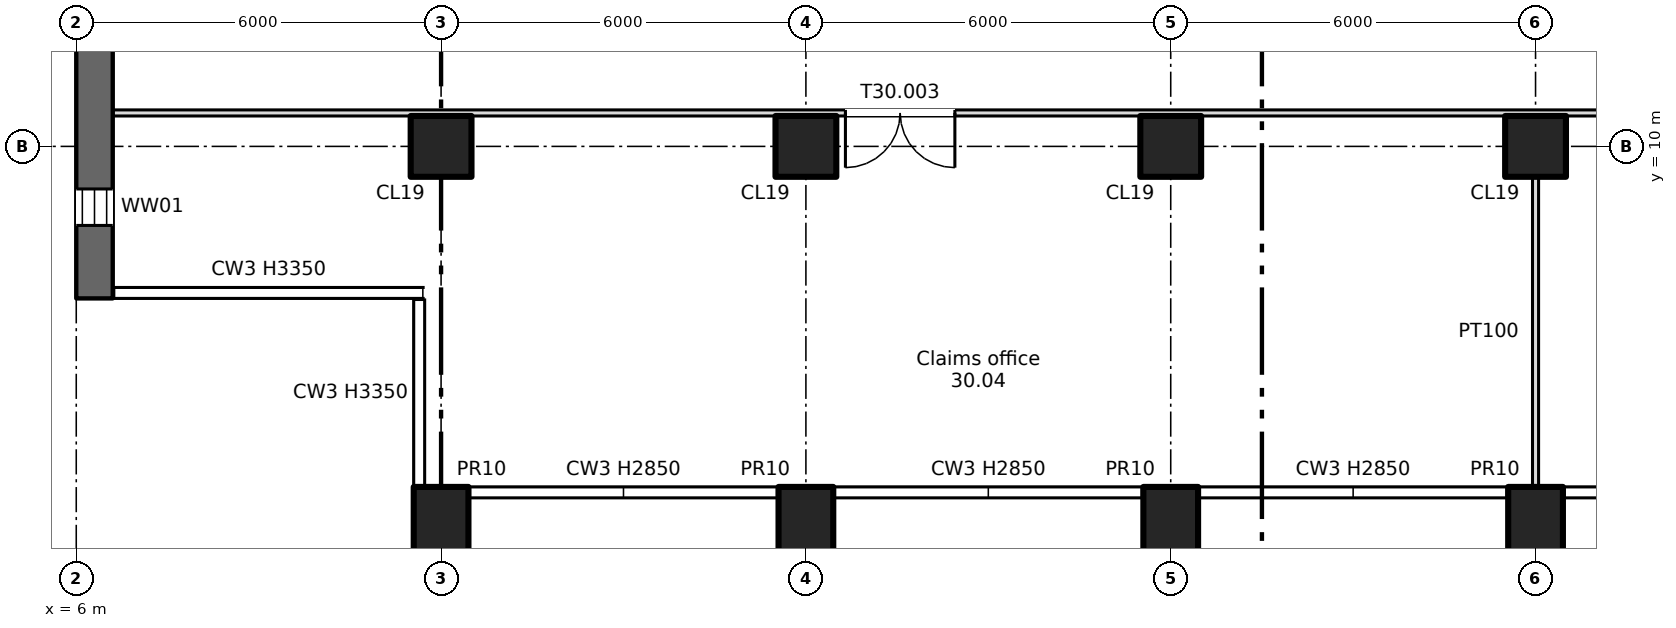
"""IFC4 building model, lengths in metres.
Left out: names, types, materials, properties, quantities, classifications, styles, units other than length and angle.
Written with IfcOpenShell. Run it as: python <this file> out.ifc"""

import sys

from ifc_helpers import new_model, si_unit, direction, frame, frame_2d, origin, origin_2d, place, context, subcontext, project, spatial, rectangle, extrude, element, fill, save


model = new_model("IFC4")
c1 = context("Model", 3, precision=1e-05, world=origin(), true_north=direction((0.0, 1.0)))
c2 = subcontext(c1, "Body", "Model", "MODEL_VIEW")
j1 = project(units=[si_unit("LENGTHUNIT", "METRE"), si_unit("PLANEANGLEUNIT", "RADIAN")], contexts=[c1])
p1 = place(None, origin())
s1 = spatial("IfcSite", under=j1, at=p1, CompositionType="ELEMENT")
p2 = place(p1, origin())
s2 = spatial("IfcBuilding", under=s1, at=p2, CompositionType="ELEMENT")
p3 = place(p2, frame((0.0, 0.0, 211.75)))
s3 = spatial("IfcBuildingStorey", under=s2, at=p3, CompositionType="ELEMENT", Elevation=211.75)
for number, where, z_axis, x_axis in (
    (1, (12.0, 3.7, -0.4), (0.0, 0.0, 1.0), (1.0, 0.0, 0.0)),
    (2, (18.0, 3.7, -0.4), (0.0, 0.0, 1.0), (1.0, 0.0, 0.0)),
    (3, (24.0, 3.7, -0.4), (0.0, 0.0, 1.0), (1.0, 0.0, 0.0)),
    (4, (30.0, 3.7, -0.4), (0.0, 0.0, 1.0), (1.0, 0.0, 0.0)),
):
    element("IfcColumn", number, at=place(p3, frame(where, z_axis=z_axis, x_axis=x_axis)), inside=s3, PredefinedType="COLUMN", context=c2, shape_type="SweptSolid", body=[
        extrude(rectangle(XDim=0.9, YDim=1.4, at=origin_2d()), origin(), (0.0, 0.0, 1.0), 3.75),
    ])
for number, where, z_axis, x_axis in (
    (5, (12.0, 10.0, 0.0), (0.0, 0.0, 1.0), (1.0, 0.0, 0.0)),
    (6, (18.0, 10.0, 0.0), (0.0, 0.0, 1.0), (1.0, 0.0, 0.0)),
    (7, (24.0, 10.0, 0.0), (0.0, 0.0, 1.0), (1.0, 0.0, 0.0)),
    (8, (30.0, 10.0, 0.0), (0.0, 0.0, 1.0), (1.0, 0.0, 0.0)),
):
    element("IfcColumn", number, at=place(p3, frame(where, z_axis=z_axis, x_axis=x_axis)), inside=s3, PredefinedType="COLUMN", context=c2, shape_type="SweptSolid", body=[
        extrude(rectangle(XDim=1.0, YDim=1.0, at=origin_2d()), origin(), (0.0, 0.0, 1.0), 3.35),
    ])
p4 = place(p3, frame((6.3, 7.5, 0.0), z_axis=(0.0, 0.0, 1.0), x_axis=(0.0, 1.0, 0.0)))
e9 = element("IfcWall", 9, at=p4, inside=s3, PredefinedType="SHEAR", context=c2, shape_type="SweptSolid", body=[
    extrude(rectangle(XDim=34.0, YDim=0.6, at=frame_2d((17.0, 0.0))), origin(), (0.0, 0.0, 1.0), 3.35),
])
p5 = place(p4, frame((1.2, 0.0, 0.6)))
e10 = element("IfcOpeningElement", 10, at=p5, cuts=e9, PredefinedType="OPENING", context=c2, shape_type="SweptSolid", body=[
    extrude(rectangle(XDim=0.6, YDim=2.4, at=frame_2d((0.3, 1.2))), frame((0.0, 0.31, 0.0), z_axis=(0.0, -1.0, 0.0), x_axis=(1.0, 0.0, 0.0)), (0.0, 0.0, 1.0), 0.62),
])
p6 = place(p4, frame((7.2, 0.0, 0.6)))
e11 = element("IfcOpeningElement", 11, at=p6, cuts=e9, PredefinedType="OPENING", context=c2, shape_type="SweptSolid", body=[
    extrude(rectangle(XDim=0.6, YDim=2.4, at=frame_2d((0.3, 1.2))), frame((0.0, 0.31, 0.0), z_axis=(0.0, -1.0, 0.0), x_axis=(1.0, 0.0, 0.0)), (0.0, 0.0, 1.0), 0.62),
])
p7 = place(p4, frame((13.2, 0.0, 0.6)))
e12 = element("IfcOpeningElement", 12, at=p7, cuts=e9, PredefinedType="OPENING", context=c2, shape_type="SweptSolid", body=[
    extrude(rectangle(XDim=0.6, YDim=2.4, at=frame_2d((0.3, 1.2))), frame((0.0, 0.31, 0.0), z_axis=(0.0, -1.0, 0.0), x_axis=(1.0, 0.0, 0.0)), (0.0, 0.0, 1.0), 0.62),
])
p8 = place(p4, frame((19.2, 0.0, 0.6)))
e13 = element("IfcOpeningElement", 13, at=p8, cuts=e9, PredefinedType="OPENING", context=c2, shape_type="SweptSolid", body=[
    extrude(rectangle(XDim=0.6, YDim=2.4, at=frame_2d((0.3, 1.2))), frame((0.0, 0.31, 0.0), z_axis=(0.0, -1.0, 0.0), x_axis=(1.0, 0.0, 0.0)), (0.0, 0.0, 1.0), 0.62),
])
p9 = place(p3, frame((6.6, 10.55, 0.0), z_axis=(0.0, 0.0, 1.0), x_axis=(1.0, 0.0, 0.0)))
e14 = element("IfcWall", 14, at=p9, inside=s3, PredefinedType="PARTITIONING", context=c2, shape_type="SweptSolid", body=[
    extrude(rectangle(XDim=64.8, YDim=0.1, at=frame_2d((32.4, 0.0))), origin(), (0.0, 0.0, 1.0), 3.35),
])
p10 = place(p9, frame((30.0, 0.0, 0.0)))
e15 = element("IfcOpeningElement", 15, at=p10, cuts=e14, PredefinedType="OPENING", context=c2, shape_type="SweptSolid", body=[
    extrude(rectangle(XDim=1.8, YDim=2.1, at=frame_2d((0.9, 1.05))), frame((0.0, 0.06, 0.0), z_axis=(0.0, -1.0, 0.0), x_axis=(1.0, 0.0, 0.0)), (0.0, 0.0, 1.0), 0.12),
])
p11 = place(p9, frame((42.0, 0.0, 0.0)))
e16 = element("IfcOpeningElement", 16, at=p11, cuts=e14, PredefinedType="OPENING", context=c2, shape_type="SweptSolid", body=[
    extrude(rectangle(XDim=1.8, YDim=2.1, at=frame_2d((0.9, 1.05))), frame((0.0, 0.06, 0.0), z_axis=(0.0, -1.0, 0.0), x_axis=(1.0, 0.0, 0.0)), (0.0, 0.0, 1.0), 0.12),
])
p12 = place(p9, frame((12.05, 0.0, 0.0)))
e17 = element("IfcOpeningElement", 17, at=p12, cuts=e14, PredefinedType="OPENING", context=c2, shape_type="SweptSolid", body=[
    extrude(rectangle(XDim=1.8, YDim=2.1, at=frame_2d((0.9, 1.05))), frame((0.0, 0.06, 0.0), z_axis=(0.0, -1.0, 0.0), x_axis=(1.0, 0.0, 0.0)), (0.0, 0.0, 1.0), 0.12),
])
p13 = place(p9, frame((55.2, 0.0, 0.0)))
e18 = element("IfcOpeningElement", 18, at=p13, cuts=e14, PredefinedType="OPENING", context=c2, shape_type="SweptSolid", body=[
    extrude(rectangle(XDim=1.8, YDim=2.1, at=frame_2d((0.9, 1.05))), frame((0.0, 0.06, 0.0), z_axis=(0.0, -1.0, 0.0), x_axis=(1.0, 0.0, 0.0)), (0.0, 0.0, 1.0), 0.12),
])
p14 = place(p3, frame((30.0, 4.4, 0.0), z_axis=(0.0, 0.0, 1.0), x_axis=(0.0, 1.0, 0.0)))
e19 = element("IfcWall", 19, at=p14, inside=s3, PredefinedType="PARTITIONING", context=c2, shape_type="SweptSolid", body=[
    extrude(rectangle(XDim=5.1, YDim=0.1, at=frame_2d((2.55, 0.0))), origin(), (0.0, 0.0, 1.0), 3.35),
])
p15 = place(p5, origin())
e20 = element("IfcWindow", 20, at=p15, inside=s3, PartitioningType="SINGLE_PANEL", PredefinedType="WINDOW", context=c2, shape_type="SweptSolid", body=[
    extrude(rectangle(XDim=0.6, YDim=2.4, at=frame_2d((0.3, 1.2))), frame((0.0, 0.03, 0.0), z_axis=(0.0, -1.0, 0.0), x_axis=(1.0, 0.0, 0.0)), (0.0, 0.0, 1.0), 0.06),
])
fill(e10, e20)
p16 = place(p12, origin())
e21 = element("IfcDoor", 21, at=p16, inside=s3, OperationType="DOUBLE_DOOR_SINGLE_SWING", PredefinedType="DOOR", context=c2, shape_type="SweptSolid", body=[
    extrude(rectangle(XDim=1.8, YDim=2.1, at=frame_2d((0.9, 1.05))), frame((0.0, 0.025, 0.0), z_axis=(0.0, -1.0, 0.0), x_axis=(1.0, 0.0, 0.0)), (0.0, 0.0, 1.0), 0.05),
])
fill(e17, e21)
save(model, sys.argv[1])
